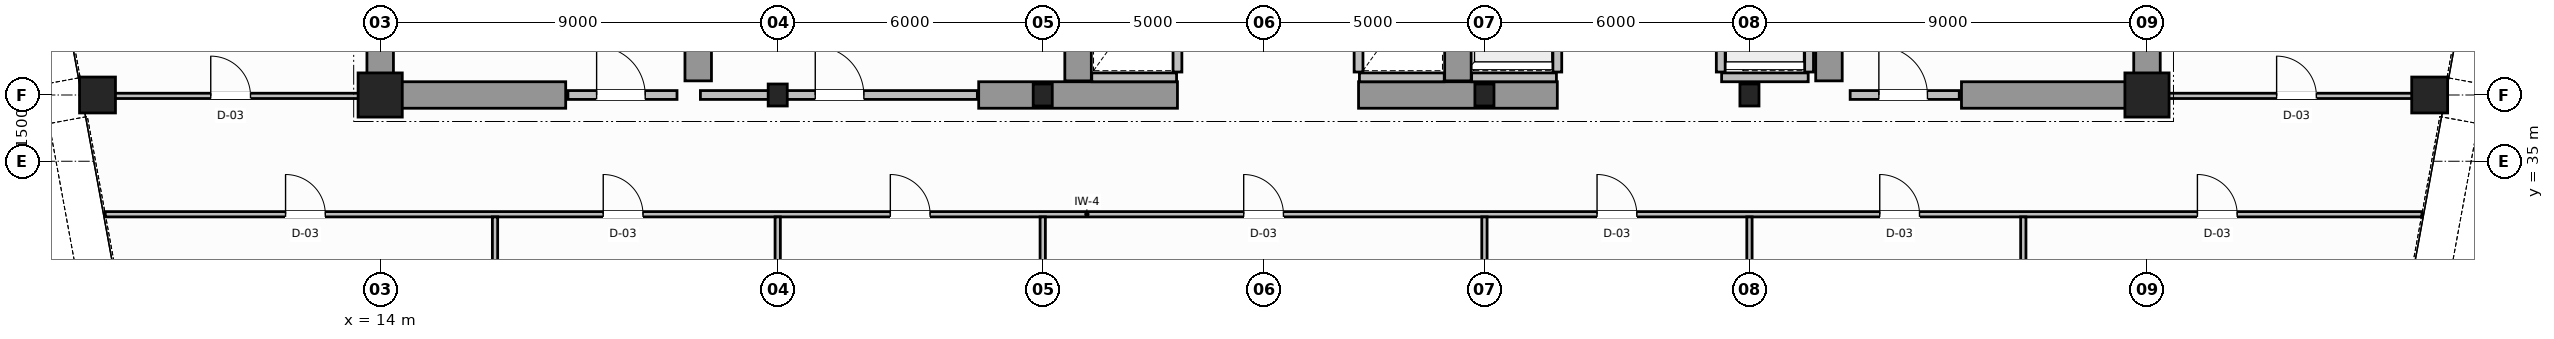
"""IFC4 building model, lengths in metres.
Left out: names, types, materials, properties, quantities, classifications, styles, units other than length and angle.
Written with IfcOpenShell. Run it as: python <this file> out.ifc"""

import sys

from ifc_helpers import new_model, si_unit, direction, frame, frame_2d, origin, origin_2d, place, context, subcontext, project, spatial, rectangle, hollow_circle, i_section, extrude, source, transform, mapped, element, fill, save


model = new_model("IFC4")
c1 = context("Model", 3, precision=1e-05, world=origin(), true_north=direction((0.0, 1.0)))
c2 = subcontext(c1, "Body", "Model", "MODEL_VIEW")
j1 = project(units=[si_unit("LENGTHUNIT", "METRE"), si_unit("PLANEANGLEUNIT", "RADIAN")], contexts=[c1])
p1 = place(None, origin())
s1 = spatial("IfcSite", under=j1, at=p1, CompositionType="ELEMENT")
p2 = place(p1, origin())
s2 = spatial("IfcBuilding", under=s1, at=p2, CompositionType="ELEMENT")
p3 = place(p2, frame((0.0, 0.0, 203.2)))
s3 = spatial("IfcBuildingStorey", under=s2, at=p3, CompositionType="ELEMENT", Elevation=203.2)
m1 = source(origin(), c2, "Body", "SweptSolid", [
    extrude(rectangle(XDim=1.0, YDim=1.0, at=origin_2d()), origin(), (0.0, 0.0, 1.0), 3.8),
])
p4 = place(p3, frame((14.0, 36.5, 0.0), z_axis=(0.0, 0.0, 1.0), x_axis=(1.0, 0.0, 0.0)))
e1 = element("IfcColumn", 1, at=p4, inside=s3, PredefinedType="COLUMN", context=c2, shape_type="MappedRepresentation", body=[
    mapped(m1, transform((0.0, 0.0, 0.0), scale=1.0)),
])
m2 = source(origin(), c2, "Body", "SweptSolid", [
    extrude(i_section(OverallWidth=0.432, OverallDepth=0.498, WebThickness=0.055, FlangeThickness=0.068, FilletRadius=0.015, at=origin_2d()), origin(), (0.0, 0.0, 1.0), 3.8),
])
for number, where, z_axis, x_axis in (
    (2, (23.0, 36.5, 0.0), (0.0, 0.0, 1.0), (1.0, 0.0, 0.0)),
    (3, (29.0, 36.5, 0.0), (0.0, 0.0, 1.0), (1.0, 0.0, 0.0)),
    (4, (39.0, 36.5, 0.0), (0.0, 0.0, 1.0), (1.0, 0.0, 0.0)),
    (5, (45.0, 36.5, 0.0), (0.0, 0.0, 1.0), (1.0, 0.0, 0.0)),
):
    element("IfcColumn", number, at=place(p3, frame(where, z_axis=z_axis, x_axis=x_axis)), inside=s3, PredefinedType="COLUMN", context=c2, shape_type="MappedRepresentation", body=[
        mapped(m2, transform((0.0, 0.0, 0.0), scale=1.0)),
    ])
p5 = place(p3, frame((54.0, 36.5, 0.0), z_axis=(0.0, 0.0, 1.0), x_axis=(1.0, 0.0, 0.0)))
e6 = element("IfcColumn", 6, at=p5, inside=s3, PredefinedType="COLUMN", context=c2, shape_type="MappedRepresentation", body=[
    mapped(m1, transform((0.0, 0.0, 0.0), scale=1.0)),
])
m3 = source(origin(), c2, "Body", "SweptSolid", [
    extrude(hollow_circle(Radius=0.406, WallThickness=0.04, at=origin_2d()), origin(), (0.0, 0.0, 1.0), 3.8),
])
for number, where, z_axis, x_axis in (
    (7, (7.6, 36.5, 0.0), (0.0, 0.0, 1.0), (1.0, 0.0, 0.0)),
    (8, (60.4, 36.5, 0.0), (0.0, 0.0, 1.0), (1.0, 0.0, 0.0)),
):
    element("IfcColumn", number, at=place(p3, frame(where, z_axis=z_axis, x_axis=x_axis)), inside=s3, PredefinedType="COLUMN", context=c2, shape_type="MappedRepresentation", body=[
        mapped(m3, transform((0.0, 0.0, 0.0), scale=1.0)),
    ])
for number, where, z_axis, x_axis in (
    (9, (14.0, 36.5, 0.0), (0.0, 0.0, 1.0), (0.0, 1.0, 0.0)),
    (10, (54.0, 36.5, 0.0), (0.0, 0.0, 1.0), (0.0, 1.0, 0.0)),
):
    element("IfcWall", number, at=place(p3, frame(where, z_axis=z_axis, x_axis=x_axis)), inside=s3, PredefinedType="SHEAR", context=c2, shape_type="SweptSolid", body=[
        extrude(rectangle(XDim=14.5, YDim=0.6, at=frame_2d((7.25, 0.0))), origin(), (0.0, 0.0, 1.0), 3.8),
    ])
p6 = place(p3, frame((14.32, 36.5, 0.0), z_axis=(0.0, 0.0, 1.0), x_axis=(1.0, 0.0, 0.0)))
e11 = element("IfcWall", 11, at=p6, inside=s3, PredefinedType="SHEAR", context=c2, shape_type="SweptSolid", body=[
    extrude(rectangle(XDim=3.88, YDim=0.6, at=frame_2d((1.94, 0.0))), origin(), (0.0, 0.0, 1.0), 2.58),
])
for number, where, z_axis, x_axis in (
    (12, (27.55, 36.5, 0.0), (0.0, 0.0, 1.0), (1.0, 0.0, 0.0)),
    (13, (36.15, 36.5, 0.0), (0.0, 0.0, 1.0), (1.0, 0.0, 0.0)),
):
    element("IfcWall", number, at=place(p3, frame(where, z_axis=z_axis, x_axis=x_axis)), inside=s3, PredefinedType="SHEAR", context=c2, shape_type="SweptSolid", body=[
        extrude(rectangle(XDim=4.5, YDim=0.6, at=frame_2d((2.25, 0.0))), origin(), (0.0, 0.0, 1.0), 3.8),
    ])
p7 = place(p3, frame((49.8, 36.5, 0.0), z_axis=(0.0, 0.0, 1.0), x_axis=(1.0, 0.0, 0.0)))
e14 = element("IfcWall", 14, at=p7, inside=s3, PredefinedType="SHEAR", context=c2, shape_type="SweptSolid", body=[
    extrude(rectangle(XDim=3.88, YDim=0.6, at=frame_2d((1.94, 0.0))), origin(), (0.0, 0.0, 1.0), 2.58),
])
for number, where, z_axis, x_axis in (
    (15, (21.2, 36.82, 0.0), (0.0, 0.0, 1.0), (0.0, 1.0, 0.0)),
    (16, (29.8, 36.82, 0.0), (0.0, 0.0, 1.0), (0.0, 1.0, 0.0)),
    (17, (38.4, 36.82, 0.0), (0.0, 0.0, 1.0), (0.0, 1.0, 0.0)),
    (18, (46.8, 36.82, 0.0), (0.0, 0.0, 1.0), (0.0, 1.0, 0.0)),
):
    element("IfcWall", number, at=place(p3, frame(where, z_axis=z_axis, x_axis=x_axis)), inside=s3, PredefinedType="SHEAR", context=c2, shape_type="SweptSolid", body=[
        extrude(rectangle(XDim=9.38, YDim=0.6, at=frame_2d((4.69, 0.0))), origin(), (0.0, 0.0, 1.0), 3.8),
    ])
p8 = place(p3, frame((18.25, 36.5, 0.0), z_axis=(0.0, 0.0, 1.0), x_axis=(1.0, 0.0, 0.0)))
e19 = element("IfcWall", 19, at=p8, inside=s3, PredefinedType="SOLIDWALL", context=c2, shape_type="SweptSolid", body=[
    extrude(rectangle(XDim=2.47, YDim=0.2, at=frame_2d((1.235, 0.0))), origin(), (0.0, 0.0, 1.0), 2.57),
])
p9 = place(p8, frame((0.65, 0.0, 0.0)))
e20 = element("IfcOpeningElement", 20, at=p9, cuts=e19, PredefinedType="OPENING", context=c2, shape_type="SweptSolid", body=[
    extrude(rectangle(XDim=1.1, YDim=2.15, at=frame_2d((0.55, 1.075))), frame((0.0, 0.11, 0.0), z_axis=(0.0, -1.0, 0.0), x_axis=(1.0, 0.0, 0.0)), (0.0, 0.0, 1.0), 0.22),
])
p10 = place(p3, frame((47.28, 36.5, 0.0), z_axis=(0.0, 0.0, 1.0), x_axis=(1.0, 0.0, 0.0)))
e21 = element("IfcWall", 21, at=p10, inside=s3, PredefinedType="SOLIDWALL", context=c2, shape_type="SweptSolid", body=[
    extrude(rectangle(XDim=2.47, YDim=0.2, at=frame_2d((1.235, 0.0))), origin(), (0.0, 0.0, 1.0), 2.57),
])
p11 = place(p10, frame((0.65, 0.0, 0.0)))
e22 = element("IfcOpeningElement", 22, at=p11, cuts=e21, PredefinedType="OPENING", context=c2, shape_type="SweptSolid", body=[
    extrude(rectangle(XDim=1.1, YDim=2.15, at=frame_2d((0.55, 1.075))), frame((0.0, 0.11, 0.0), z_axis=(0.0, -1.0, 0.0), x_axis=(1.0, 0.0, 0.0)), (0.0, 0.0, 1.0), 0.22),
])
p12 = place(p3, frame((30.11, 36.9, 0.0), z_axis=(0.0, 0.0, 1.0), x_axis=(1.0, 0.0, 0.0)))
e23 = element("IfcWall", 23, at=p12, inside=s3, PredefinedType="SOLIDWALL", context=c2, shape_type="SweptSolid", body=[
    extrude(rectangle(XDim=1.92, YDim=0.2, at=frame_2d((0.96, 0.0))), origin(), (0.0, 0.0, 1.0), 2.37),
])
p13 = place(p3, frame((32.05, 37.02, 0.0), z_axis=(0.0, 0.0, 1.0), x_axis=(0.0, 1.0, 0.0)))
e24 = element("IfcWall", 24, at=p13, inside=s3, PredefinedType="SOLIDWALL", context=c2, shape_type="SweptSolid", body=[
    extrude(rectangle(XDim=2.56, YDim=0.2, at=frame_2d((1.28, 0.0))), origin(), (0.0, 0.0, 1.0), 3.58),
])
p14 = place(p3, frame((36.17, 36.9, 0.0), z_axis=(0.0, 0.0, 1.0), x_axis=(1.0, 0.0, 0.0)))
e25 = element("IfcWall", 25, at=p14, inside=s3, PredefinedType="SOLIDWALL", context=c2, shape_type="SweptSolid", body=[
    extrude(rectangle(XDim=1.92, YDim=0.2, at=frame_2d((0.96, 0.0))), origin(), (0.0, 0.0, 1.0), 2.37),
])
p15 = place(p3, frame((36.15, 37.02, 0.0), z_axis=(0.0, 0.0, 1.0), x_axis=(0.0, 1.0, 0.0)))
e26 = element("IfcWall", 26, at=p15, inside=s3, PredefinedType="SOLIDWALL", context=c2, shape_type="SweptSolid", body=[
    extrude(rectangle(XDim=2.56, YDim=0.2, at=frame_2d((1.28, 0.0))), origin(), (0.0, 0.0, 1.0), 3.58),
])
p16 = place(p3, frame((38.71, 36.9, 0.0), z_axis=(0.0, 0.0, 1.0), x_axis=(1.0, 0.0, 0.0)))
e27 = element("IfcWall", 27, at=p16, inside=s3, PredefinedType="SOLIDWALL", context=c2, shape_type="SweptSolid", body=[
    extrude(rectangle(XDim=1.92, YDim=0.2, at=frame_2d((0.96, 0.0))), origin(), (0.0, 0.0, 1.0), 2.37),
])
p17 = place(p3, frame((40.65, 37.02, 0.0), z_axis=(0.0, 0.0, 1.0), x_axis=(0.0, 1.0, 0.0)))
e28 = element("IfcWall", 28, at=p17, inside=s3, PredefinedType="SOLIDWALL", context=c2, shape_type="SweptSolid", body=[
    extrude(rectangle(XDim=2.56, YDim=0.2, at=frame_2d((1.28, 0.0))), origin(), (0.0, 0.0, 1.0), 3.58),
])
p18 = place(p3, frame((44.37, 36.9, 0.0), z_axis=(0.0, 0.0, 1.0), x_axis=(1.0, 0.0, 0.0)))
e29 = element("IfcWall", 29, at=p18, inside=s3, PredefinedType="SOLIDWALL", context=c2, shape_type="SweptSolid", body=[
    extrude(rectangle(XDim=1.96, YDim=0.2, at=frame_2d((0.98, 0.0))), origin(), (0.0, 0.0, 1.0), 2.37),
])
for number, where, z_axis, x_axis in (
    (30, (44.35, 37.02, 0.0), (0.0, 0.0, 1.0), (0.0, 1.0, 0.0)),
    (31, (46.35, 37.02, 0.0), (0.0, 0.0, 1.0), (0.0, 1.0, 0.0)),
):
    element("IfcWall", number, at=place(p3, frame(where, z_axis=z_axis, x_axis=x_axis)), inside=s3, PredefinedType="SOLIDWALL", context=c2, shape_type="SweptSolid", body=[
        extrude(rectangle(XDim=2.56, YDim=0.2, at=frame_2d((1.28, 0.0))), origin(), (0.0, 0.0, 1.0), 3.58),
    ])
p19 = place(p3, frame((21.25, 36.5, 0.0), z_axis=(0.0, 0.0, 1.0), x_axis=(1.0, 0.0, 0.0)))
e32 = element("IfcWall", 32, at=p19, inside=s3, PredefinedType="SOLIDWALL", context=c2, shape_type="SweptSolid", body=[
    extrude(rectangle(XDim=6.27, YDim=0.2, at=frame_2d((3.135, 0.0))), origin(), (0.0, 0.0, 1.0), 2.37),
])
p20 = place(p19, frame((2.6, 0.0, 0.0)))
e33 = element("IfcOpeningElement", 33, at=p20, cuts=e32, PredefinedType="OPENING", context=c2, shape_type="SweptSolid", body=[
    extrude(rectangle(XDim=1.1, YDim=2.15, at=frame_2d((0.55, 1.075))), frame((0.0, 0.11, 0.0), z_axis=(0.0, -1.0, 0.0), x_axis=(1.0, 0.0, 0.0)), (0.0, 0.0, 1.0), 0.22),
])
p21 = place(p3, frame((7.776, 33.8, 0.0), z_axis=(0.0, 0.0, 1.0), x_axis=(1.0, 0.0, 0.0)))
e34 = element("IfcWall", 34, at=p21, inside=s3, PredefinedType="PARTITIONING", context=c2, shape_type="SweptSolid", body=[
    extrude(rectangle(XDim=52.449, YDim=0.12, at=frame_2d((26.224, 0.0))), origin(), (0.0, 0.0, 1.0), 3.58),
])
p22 = place(p21, frame((4.082, 0.0, 0.0)))
e35 = element("IfcOpeningElement", 35, at=p22, cuts=e34, PredefinedType="OPENING", context=c2, shape_type="SweptSolid", body=[
    extrude(rectangle(XDim=0.9, YDim=2.15, at=frame_2d((0.45, 1.075))), frame((0.0, 0.07, 0.0), z_axis=(0.0, -1.0, 0.0), x_axis=(1.0, 0.0, 0.0)), (0.0, 0.0, 1.0), 0.14),
])
p23 = place(p21, frame((11.274, 0.0, 0.0)))
e36 = element("IfcOpeningElement", 36, at=p23, cuts=e34, PredefinedType="OPENING", context=c2, shape_type="SweptSolid", body=[
    extrude(rectangle(XDim=0.9, YDim=2.15, at=frame_2d((0.45, 1.075))), frame((0.0, 0.07, 0.0), z_axis=(0.0, -1.0, 0.0), x_axis=(1.0, 0.0, 0.0)), (0.0, 0.0, 1.0), 0.14),
])
p24 = place(p21, frame((17.774, 0.0, 0.0)))
e37 = element("IfcOpeningElement", 37, at=p24, cuts=e34, PredefinedType="OPENING", context=c2, shape_type="SweptSolid", body=[
    extrude(rectangle(XDim=0.9, YDim=2.15, at=frame_2d((0.45, 1.075))), frame((0.0, 0.07, 0.0), z_axis=(0.0, -1.0, 0.0), x_axis=(1.0, 0.0, 0.0)), (0.0, 0.0, 1.0), 0.14),
])
p25 = place(p21, frame((25.774, 0.0, 0.0)))
e38 = element("IfcOpeningElement", 38, at=p25, cuts=e34, PredefinedType="OPENING", context=c2, shape_type="SweptSolid", body=[
    extrude(rectangle(XDim=0.9, YDim=2.15, at=frame_2d((0.45, 1.075))), frame((0.0, 0.07, 0.0), z_axis=(0.0, -1.0, 0.0), x_axis=(1.0, 0.0, 0.0)), (0.0, 0.0, 1.0), 0.14),
])
p26 = place(p21, frame((33.774, 0.0, 0.0)))
e39 = element("IfcOpeningElement", 39, at=p26, cuts=e34, PredefinedType="OPENING", context=c2, shape_type="SweptSolid", body=[
    extrude(rectangle(XDim=0.9, YDim=2.15, at=frame_2d((0.45, 1.075))), frame((0.0, 0.07, 0.0), z_axis=(0.0, -1.0, 0.0), x_axis=(1.0, 0.0, 0.0)), (0.0, 0.0, 1.0), 0.14),
])
p27 = place(p21, frame((40.174, 0.0, 0.0)))
e40 = element("IfcOpeningElement", 40, at=p27, cuts=e34, PredefinedType="OPENING", context=c2, shape_type="SweptSolid", body=[
    extrude(rectangle(XDim=0.9, YDim=2.15, at=frame_2d((0.45, 1.075))), frame((0.0, 0.07, 0.0), z_axis=(0.0, -1.0, 0.0), x_axis=(1.0, 0.0, 0.0)), (0.0, 0.0, 1.0), 0.14),
])
p28 = place(p21, frame((47.366, 0.0, 0.0)))
e41 = element("IfcOpeningElement", 41, at=p28, cuts=e34, PredefinedType="OPENING", context=c2, shape_type="SweptSolid", body=[
    extrude(rectangle(XDim=0.9, YDim=2.15, at=frame_2d((0.45, 1.075))), frame((0.0, 0.07, 0.0), z_axis=(0.0, -1.0, 0.0), x_axis=(1.0, 0.0, 0.0)), (0.0, 0.0, 1.0), 0.14),
])
p29 = place(p3, frame((7.289, 36.48, 0.0), z_axis=(0.0, 0.0, 1.0), x_axis=(1.0, 0.0, 0.0)))
e42 = element("IfcWall", 42, at=p29, inside=s3, PredefinedType="PARTITIONING", context=c2, shape_type="SweptSolid", body=[
    extrude(rectangle(XDim=6.651, YDim=0.12, at=frame_2d((3.325, 0.0))), origin(), (0.0, 0.0, 1.0), 2.37),
])
p30 = place(p29, frame((2.875, 0.0, 0.0)))
e43 = element("IfcOpeningElement", 43, at=p30, cuts=e42, PredefinedType="OPENING", context=c2, shape_type="SweptSolid", body=[
    extrude(rectangle(XDim=0.9, YDim=2.15, at=frame_2d((0.45, 1.075))), frame((0.0, 0.07, 0.0), z_axis=(0.0, -1.0, 0.0), x_axis=(1.0, 0.0, 0.0)), (0.0, 0.0, 1.0), 0.14),
])
p31 = place(p3, frame((54.06, 36.48, 0.0), z_axis=(0.0, 0.0, 1.0), x_axis=(1.0, 0.0, 0.0)))
e44 = element("IfcWall", 44, at=p31, inside=s3, PredefinedType="PARTITIONING", context=c2, shape_type="SweptSolid", body=[
    extrude(rectangle(XDim=6.651, YDim=0.12, at=frame_2d((3.325, 0.0))), origin(), (0.0, 0.0, 1.0), 2.37),
])
p32 = place(p31, frame((2.875, 0.0, 0.0)))
e45 = element("IfcOpeningElement", 45, at=p32, cuts=e44, PredefinedType="OPENING", context=c2, shape_type="SweptSolid", body=[
    extrude(rectangle(XDim=0.9, YDim=2.15, at=frame_2d((0.45, 1.075))), frame((0.0, 0.07, 0.0), z_axis=(0.0, -1.0, 0.0), x_axis=(1.0, 0.0, 0.0)), (0.0, 0.0, 1.0), 0.14),
])
for number, where, z_axis, x_axis in (
    (46, (23.0, 28.14, 0.0), (0.0, 0.0, 1.0), (0.0, 1.0, 0.0)),
    (47, (29.0, 28.14, 0.0), (0.0, 0.0, 1.0), (0.0, 1.0, 0.0)),
    (48, (39.0, 28.14, 0.0), (0.0, 0.0, 1.0), (0.0, 1.0, 0.0)),
    (49, (45.0, 28.14, 0.0), (0.0, 0.0, 1.0), (0.0, 1.0, 0.0)),
):
    element("IfcWall", number, at=place(p3, frame(where, z_axis=z_axis, x_axis=x_axis)), inside=s3, PredefinedType="PARTITIONING", context=c2, shape_type="SweptSolid", body=[
        extrude(rectangle(XDim=5.6, YDim=0.12, at=frame_2d((2.8, 0.0))), origin(), (0.0, 0.0, 1.0), 2.37),
    ])
for number, where, z_axis, x_axis in (
    (50, (16.6, 18.64, 0.0), (0.0, 0.0, 1.0), (0.0, 1.0, 0.0)),
    (51, (51.2, 18.64, 0.0), (0.0, 0.0, 1.0), (0.0, 1.0, 0.0)),
):
    element("IfcWall", number, at=place(p3, frame(where, z_axis=z_axis, x_axis=x_axis)), inside=s3, PredefinedType="PARTITIONING", context=c2, shape_type="SweptSolid", body=[
        extrude(rectangle(XDim=15.1, YDim=0.12, at=frame_2d((7.55, 0.0))), origin(), (0.0, 0.0, 1.0), 3.58),
    ])
m4 = source(origin(), c2, "Body", "SweptSolid", [
    extrude(rectangle(XDim=1.1, YDim=2.15, at=frame_2d((0.55, 1.075))), frame((0.0, 0.025, 0.0), z_axis=(0.0, -1.0, 0.0), x_axis=(1.0, 0.0, 0.0)), (0.0, 0.0, 1.0), 0.05),
])
p33 = place(p9, origin())
e52 = element("IfcDoor", 52, at=p33, inside=s3, OperationType="SINGLE_SWING_RIGHT", PredefinedType="DOOR", context=c2, shape_type="MappedRepresentation", body=[
    mapped(m4, transform((0.0, 0.0, 0.0), scale=1.0)),
])
fill(e20, e52)
p34 = place(p11, origin())
e53 = element("IfcDoor", 53, at=p34, inside=s3, OperationType="SINGLE_SWING_LEFT", PredefinedType="DOOR", context=c2, shape_type="MappedRepresentation", body=[
    mapped(m4, transform((0.0, 0.0, 0.0), scale=1.0)),
])
fill(e22, e53)
p35 = place(p20, origin())
e54 = element("IfcDoor", 54, at=p35, inside=s3, OperationType="SINGLE_SWING_LEFT", PredefinedType="DOOR", context=c2, shape_type="MappedRepresentation", body=[
    mapped(m4, transform((0.0, 0.0, 0.0), scale=1.0)),
])
fill(e33, e54)
m5 = source(origin(), c2, "Body", "SweptSolid", [
    extrude(rectangle(XDim=0.9, YDim=2.15, at=frame_2d((0.45, 1.075))), frame((0.0, 0.025, 0.0), z_axis=(0.0, -1.0, 0.0), x_axis=(1.0, 0.0, 0.0)), (0.0, 0.0, 1.0), 0.05),
])
p36 = place(p30, origin())
e55 = element("IfcDoor", 55, at=p36, inside=s3, OperationType="SINGLE_SWING_LEFT", PredefinedType="DOOR", context=c2, shape_type="MappedRepresentation", body=[
    mapped(m5, transform((0.0, 0.0, 0.0), scale=1.0)),
])
fill(e43, e55)
p37 = place(p32, origin())
e56 = element("IfcDoor", 56, at=p37, inside=s3, OperationType="SINGLE_SWING_RIGHT", PredefinedType="DOOR", context=c2, shape_type="MappedRepresentation", body=[
    mapped(m5, transform((0.0, 0.0, 0.0), scale=1.0)),
])
fill(e45, e56)
p38 = place(p22, origin())
e57 = element("IfcDoor", 57, at=p38, inside=s3, OperationType="SINGLE_SWING_LEFT", PredefinedType="DOOR", context=c2, shape_type="MappedRepresentation", body=[
    mapped(m5, transform((0.0, 0.0, 0.0), scale=1.0)),
])
fill(e35, e57)
p39 = place(p23, origin())
e58 = element("IfcDoor", 58, at=p39, inside=s3, OperationType="SINGLE_SWING_RIGHT", PredefinedType="DOOR", context=c2, shape_type="MappedRepresentation", body=[
    mapped(m5, transform((0.0, 0.0, 0.0), scale=1.0)),
])
fill(e36, e58)
p40 = place(p24, origin())
e59 = element("IfcDoor", 59, at=p40, inside=s3, OperationType="SINGLE_SWING_LEFT", PredefinedType="DOOR", context=c2, shape_type="MappedRepresentation", body=[
    mapped(m5, transform((0.0, 0.0, 0.0), scale=1.0)),
])
fill(e37, e59)
p41 = place(p25, origin())
e60 = element("IfcDoor", 60, at=p41, inside=s3, OperationType="SINGLE_SWING_RIGHT", PredefinedType="DOOR", context=c2, shape_type="MappedRepresentation", body=[
    mapped(m5, transform((0.0, 0.0, 0.0), scale=1.0)),
])
fill(e38, e60)
p42 = place(p26, origin())
e61 = element("IfcDoor", 61, at=p42, inside=s3, OperationType="SINGLE_SWING_LEFT", PredefinedType="DOOR", context=c2, shape_type="MappedRepresentation", body=[
    mapped(m5, transform((0.0, 0.0, 0.0), scale=1.0)),
])
fill(e39, e61)
p43 = place(p27, origin())
e62 = element("IfcDoor", 62, at=p43, inside=s3, OperationType="SINGLE_SWING_RIGHT", PredefinedType="DOOR", context=c2, shape_type="MappedRepresentation", body=[
    mapped(m5, transform((0.0, 0.0, 0.0), scale=1.0)),
])
fill(e40, e62)
p44 = place(p28, origin())
e63 = element("IfcDoor", 63, at=p44, inside=s3, OperationType="SINGLE_SWING_LEFT", PredefinedType="DOOR", context=c2, shape_type="MappedRepresentation", body=[
    mapped(m5, transform((0.0, 0.0, 0.0), scale=1.0)),
])
fill(e41, e63)
save(model, sys.argv[1])
